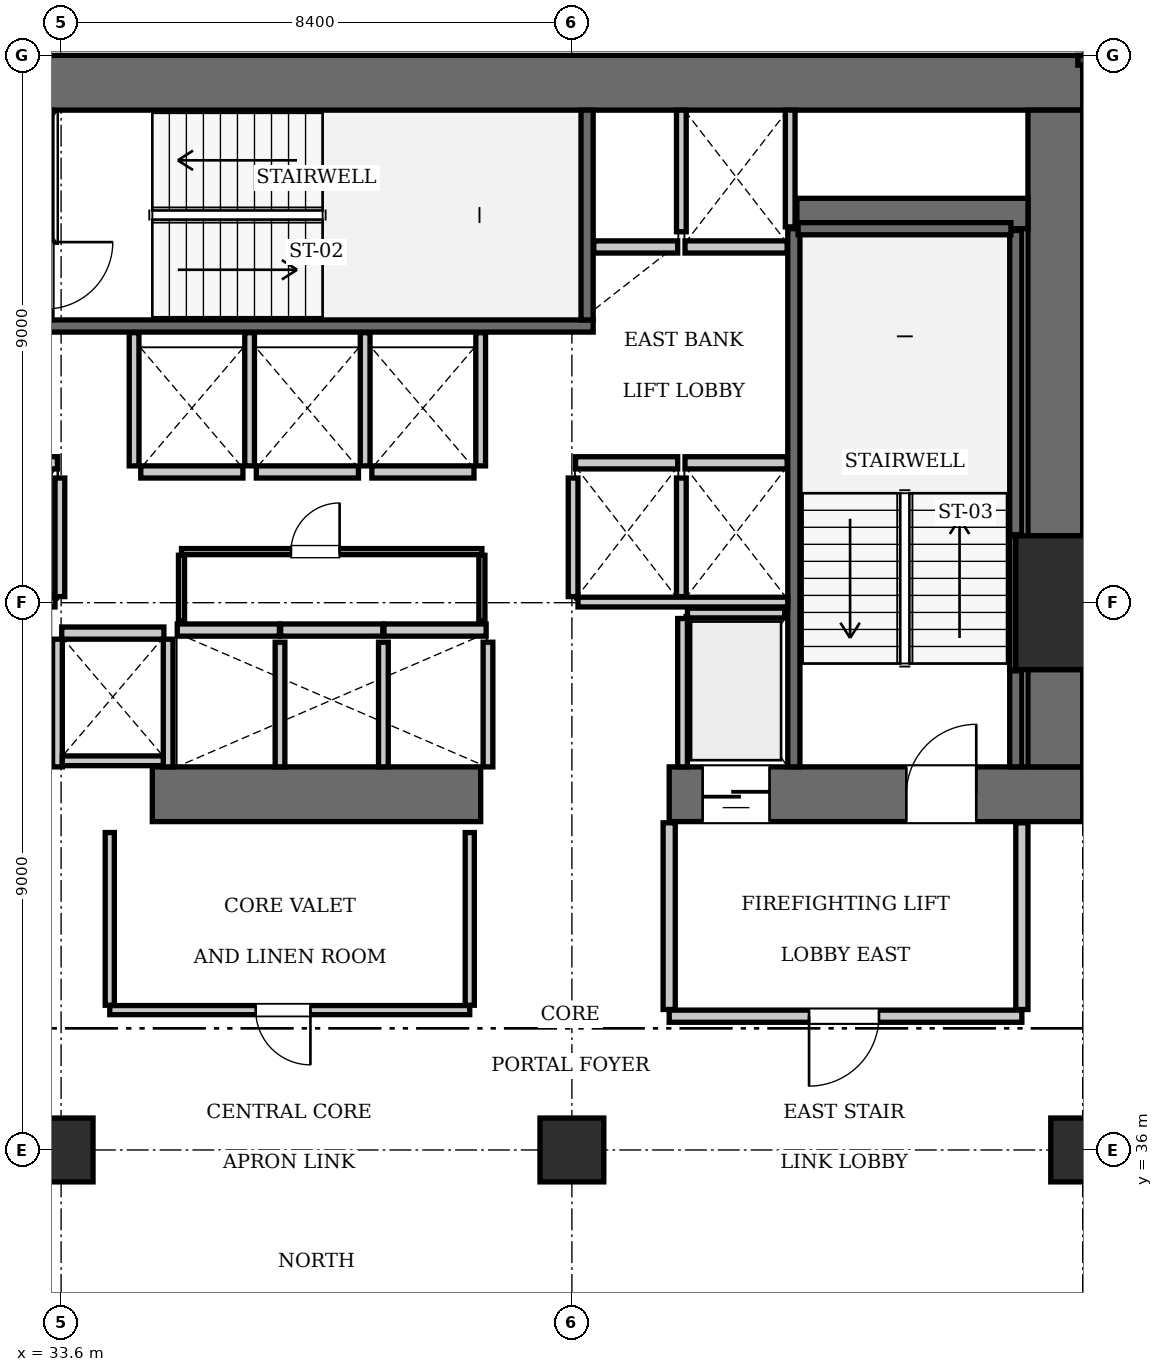
"""IFC4 building model, lengths in metres.
Left out: names, types, materials, properties, quantities, classifications, styles, units other than length and angle.
Written with IfcOpenShell. Run it as: python <this file> out.ifc"""

import sys

from ifc_helpers import new_model, si_unit, direction, frame, frame_2d, origin, origin_2d, place, context, subcontext, project, spatial, rectangle, extrude, element, fill, save


model = new_model("IFC4")
c1 = context("Model", 3, precision=1e-05, world=origin(), true_north=direction((0.0, 1.0)))
c2 = subcontext(c1, "Body", "Model", "MODEL_VIEW")
j1 = project(units=[si_unit("LENGTHUNIT", "METRE"), si_unit("PLANEANGLEUNIT", "RADIAN")], contexts=[c1])
p1 = place(None, origin())
s1 = spatial("IfcSite", under=j1, at=p1, CompositionType="ELEMENT")
p2 = place(p1, origin())
s2 = spatial("IfcBuilding", under=s1, at=p2, CompositionType="ELEMENT")
p3 = place(p2, frame((0.0, 0.0, 100.1)))
s3 = spatial("IfcBuildingStorey", under=s2, at=p3, CompositionType="ELEMENT", Elevation=100.1)
p4 = place(p3, frame((50.4, 45.0, 0.0), z_axis=(0.0, 0.0, 1.0), x_axis=(1.0, 0.0, 0.0)))
e1 = element("IfcColumn", 1, at=p4, inside=s3, PredefinedType="COLUMN", context=c2, shape_type="SweptSolid", body=[
    extrude(rectangle(XDim=2.2, YDim=2.2, at=origin_2d()), origin(), (0.0, 0.0, 1.0), 3.85),
])
p5 = place(p3, frame((25.2, 53.55, 0.0), z_axis=(0.0, 0.0, 1.0), x_axis=(1.0, 0.0, 0.0)))
e2 = element("IfcWall", 2, at=p5, inside=s3, PredefinedType="SHEAR", context=c2, shape_type="SweptSolid", body=[
    extrude(rectangle(XDim=25.2, YDim=0.9, at=frame_2d((12.6, 0.0))), origin(), (0.0, 0.0, 1.0), 3.85),
])
p6 = place(p3, frame((35.1, 41.85, 0.0), z_axis=(0.0, 0.0, 1.0), x_axis=(1.0, 0.0, 0.0)))
e3 = element("IfcWall", 3, at=p6, inside=s3, PredefinedType="SHEAR", context=c2, shape_type="SweptSolid", body=[
    extrude(rectangle(XDim=5.4, YDim=0.9, at=frame_2d((2.7, 0.0))), origin(), (0.0, 0.0, 1.0), 3.85),
])
p7 = place(p3, frame((43.6, 41.85, 0.0), z_axis=(0.0, 0.0, 1.0), x_axis=(1.0, 0.0, 0.0)))
e4 = element("IfcWall", 4, at=p7, inside=s3, PredefinedType="SHEAR", context=c2, shape_type="SweptSolid", body=[
    extrude(rectangle(XDim=6.8, YDim=0.9, at=frame_2d((3.4, 0.0))), origin(), (0.0, 0.0, 1.0), 3.85),
])
p8 = place(p7, frame((3.9, 0.0, 0.0)))
e5 = element("IfcOpeningElement", 5, at=p8, cuts=e4, PredefinedType="OPENING", context=c2, shape_type="SweptSolid", body=[
    extrude(rectangle(XDim=1.15, YDim=2.15, at=frame_2d((0.575, 1.075))), frame((0.0, 0.46, 0.0), z_axis=(0.0, -1.0, 0.0), x_axis=(1.0, 0.0, 0.0)), (0.0, 0.0, 1.0), 0.92),
])
p9 = place(p7, frame((0.55, 0.0, 0.0)))
e6 = element("IfcOpeningElement", 6, at=p9, cuts=e4, PredefinedType="OPENING", context=c2, shape_type="SweptSolid", body=[
    extrude(rectangle(XDim=1.1, YDim=2.2, at=frame_2d((0.55, 1.1))), frame((0.0, 0.46, 0.0), z_axis=(0.0, -1.0, 0.0), x_axis=(1.0, 0.0, 0.0)), (0.0, 0.0, 1.0), 0.92),
])
p10 = place(p3, frame((49.95, 42.3, 0.0), z_axis=(0.0, 0.0, 1.0), x_axis=(0.0, 1.0, 0.0)))
e7 = element("IfcWall", 7, at=p10, inside=s3, PredefinedType="SHEAR", context=c2, shape_type="SweptSolid", body=[
    extrude(rectangle(XDim=1.6, YDim=0.9, at=frame_2d((0.8, 0.0))), origin(), (0.0, 0.0, 1.0), 3.85),
])
p11 = place(p3, frame((49.95, 46.1, 0.0), z_axis=(0.0, 0.0, 1.0), x_axis=(0.0, 1.0, 0.0)))
e8 = element("IfcWall", 8, at=p11, inside=s3, PredefinedType="SHEAR", context=c2, shape_type="SweptSolid", body=[
    extrude(rectangle(XDim=7.0, YDim=0.9, at=frame_2d((3.5, 0.0))), origin(), (0.0, 0.0, 1.0), 3.85),
])
p12 = place(p3, frame((45.7, 51.4, 0.0), z_axis=(0.0, 0.0, 1.0), x_axis=(1.0, 0.0, 0.0)))
e9 = element("IfcWall", 9, at=p12, inside=s3, PredefinedType="SHEAR", context=c2, shape_type="SweptSolid", body=[
    extrude(rectangle(XDim=3.8, YDim=0.5, at=frame_2d((1.9, 0.0))), origin(), (0.0, 0.0, 1.0), 3.85),
])
for number, where, z_axis, x_axis in (
    (10, (33.6, 36.0, 0.0), (0.0, 0.0, 1.0), (1.0, 0.0, 0.0)),
    (11, (42.0, 36.0, 0.0), (0.0, 0.0, 1.0), (1.0, 0.0, 0.0)),
    (12, (50.4, 36.0, 0.0), (0.0, 0.0, 1.0), (1.0, 0.0, 0.0)),
):
    element("IfcColumn", number, at=place(p3, frame(where, z_axis=z_axis, x_axis=x_axis)), inside=s3, PredefinedType="COLUMN", context=c2, shape_type="SweptSolid", body=[
        extrude(rectangle(XDim=1.05, YDim=1.05, at=origin_2d()), origin(), (0.0, 0.0, 1.0), 3.85),
    ])
p13 = place(p3, frame((33.25, 49.55, 0.0), z_axis=(0.0, 0.0, 1.0), x_axis=(1.0, 0.0, 0.0)))
e13 = element("IfcWall", 13, at=p13, inside=s3, PredefinedType="SOLIDWALL", context=c2, shape_type="SweptSolid", body=[
    extrude(rectangle(XDim=9.1, YDim=0.2, at=frame_2d((4.55, 0.0))), origin(), (0.0, 0.0, 1.0), 3.61),
])
p14 = place(p3, frame((42.25, 49.65, 0.0), z_axis=(0.0, 0.0, 1.0), x_axis=(0.0, 1.0, 0.0)))
e14 = element("IfcWall", 14, at=p14, inside=s3, PredefinedType="SOLIDWALL", context=c2, shape_type="SweptSolid", body=[
    extrude(rectangle(XDim=3.45, YDim=0.2, at=frame_2d((1.725, 0.0))), origin(), (0.0, 0.0, 1.0), 3.61),
])
p15 = place(p3, frame((33.35, 49.65, 0.0), z_axis=(0.0, 0.0, 1.0), x_axis=(0.0, 1.0, 0.0)))
e15 = element("IfcWall", 15, at=p15, inside=s3, PredefinedType="SOLIDWALL", context=c2, shape_type="SweptSolid", body=[
    extrude(rectangle(XDim=3.45, YDim=0.2, at=frame_2d((1.725, 0.0))), origin(), (0.0, 0.0, 1.0), 3.61),
])
p16 = place(p15, frame((0.18, 0.0, 0.0)))
e16 = element("IfcOpeningElement", 16, at=p16, cuts=e15, PredefinedType="OPENING", context=c2, shape_type="SweptSolid", body=[
    extrude(rectangle(XDim=1.1, YDim=2.15, at=frame_2d((0.55, 1.075))), frame((0.0, 0.11, 0.0), z_axis=(0.0, -1.0, 0.0), x_axis=(1.0, 0.0, 0.0)), (0.0, 0.0, 1.0), 0.22),
])
p17 = place(p3, frame((45.65, 42.3, 0.0), z_axis=(0.0, 0.0, 1.0), x_axis=(0.0, 1.0, 0.0)))
e17 = element("IfcWall", 17, at=p17, inside=s3, PredefinedType="SOLIDWALL", context=c2, shape_type="SweptSolid", body=[
    extrude(rectangle(XDim=8.85, YDim=0.2, at=frame_2d((4.425, 0.0))), origin(), (0.0, 0.0, 1.0), 3.61),
])
p18 = place(p3, frame((49.3, 42.3, 0.0), z_axis=(0.0, 0.0, 1.0), x_axis=(0.0, 1.0, 0.0)))
e18 = element("IfcWall", 18, at=p18, inside=s3, PredefinedType="SOLIDWALL", context=c2, shape_type="SweptSolid", body=[
    extrude(rectangle(XDim=1.58, YDim=0.2, at=frame_2d((0.79, 0.0))), origin(), (0.0, 0.0, 1.0), 3.61),
])
p19 = place(p3, frame((49.3, 46.12, 0.0), z_axis=(0.0, 0.0, 1.0), x_axis=(0.0, 1.0, 0.0)))
e19 = element("IfcWall", 19, at=p19, inside=s3, PredefinedType="SOLIDWALL", context=c2, shape_type="SweptSolid", body=[
    extrude(rectangle(XDim=5.0, YDim=0.2, at=frame_2d((2.5, 0.0))), origin(), (0.0, 0.0, 1.0), 3.61),
])
p20 = place(p3, frame((45.72, 51.15, 0.0), z_axis=(0.0, 0.0, 1.0), x_axis=(1.0, 0.0, 0.0)))
e20 = element("IfcWall", 20, at=p20, inside=s3, PredefinedType="SOLIDWALL", context=c2, shape_type="SweptSolid", body=[
    extrude(rectangle(XDim=3.5, YDim=0.2, at=frame_2d((1.75, 0.0))), origin(), (0.0, 0.0, 1.0), 3.61),
])
p21 = place(p3, frame((49.248, 43.9, 0.0), z_axis=(0.0, 0.0, 1.0), x_axis=(0.0, 1.0, 0.0)))
e21 = element("IfcWall", 21, at=p21, inside=s3, PredefinedType="SOLIDWALL", context=c2, shape_type="SweptSolid", body=[
    extrude(rectangle(XDim=2.2, YDim=0.1, at=frame_2d((1.1, 0.0))), origin(), (0.0, 0.0, 1.0), 3.61),
])
p22 = place(p3, frame((31.86, 47.3, 0.0), z_axis=(0.0, 0.0, 1.0), x_axis=(1.0, 0.0, 0.0)))
e22 = element("IfcWall", 22, at=p22, inside=s3, PredefinedType="SOLIDWALL", context=c2, shape_type="SweptSolid", body=[
    extrude(rectangle(XDim=1.68, YDim=0.2, at=frame_2d((0.84, 0.0))), origin(), (0.0, 0.0, 1.0), 3.61),
])
p23 = place(p22, frame((0.34, 0.0, 0.0)))
e23 = element("IfcOpeningElement", 23, at=p23, cuts=e22, PredefinedType="OPENING", context=c2, shape_type="SweptSolid", body=[
    extrude(rectangle(XDim=1.0, YDim=2.15, at=frame_2d((0.5, 1.075))), frame((0.0, 0.11, 0.0), z_axis=(0.0, -1.0, 0.0), x_axis=(1.0, 0.0, 0.0)), (0.0, 0.0, 1.0), 0.22),
])
for number, where, z_axis, x_axis in (
    (24, (42.06, 47.3, 0.0), (0.0, 0.0, 1.0), (1.0, 0.0, 0.0)),
    (25, (43.86, 47.3, 0.0), (0.0, 0.0, 1.0), (1.0, 0.0, 0.0)),
):
    element("IfcWall", number, at=place(p3, frame(where, z_axis=z_axis, x_axis=x_axis)), inside=s3, PredefinedType="SOLIDWALL", context=c2, shape_type="SweptSolid", body=[
        extrude(rectangle(XDim=1.68, YDim=0.2, at=frame_2d((0.84, 0.0))), origin(), (0.0, 0.0, 1.0), 3.61),
    ])
p24 = place(p3, frame((42.36, 50.85, 0.0), z_axis=(0.0, 0.0, 1.0), x_axis=(1.0, 0.0, 0.0)))
e26 = element("IfcWall", 26, at=p24, inside=s3, PredefinedType="SOLIDWALL", context=c2, shape_type="SweptSolid", body=[
    extrude(rectangle(XDim=1.38, YDim=0.2, at=frame_2d((0.69, 0.0))), origin(), (0.0, 0.0, 1.0), 3.61),
])
for number, where, z_axis, x_axis in (
    (27, (43.86, 50.85, 0.0), (0.0, 0.0, 1.0), (1.0, 0.0, 0.0)),
    (28, (35.51, 44.55, 0.0), (0.0, 0.0, 1.0), (1.0, 0.0, 0.0)),
    (29, (37.21, 44.55, 0.0), (0.0, 0.0, 1.0), (1.0, 0.0, 0.0)),
):
    element("IfcWall", number, at=place(p3, frame(where, z_axis=z_axis, x_axis=x_axis)), inside=s3, PredefinedType="SOLIDWALL", context=c2, shape_type="SweptSolid", body=[
        extrude(rectangle(XDim=1.68, YDim=0.2, at=frame_2d((0.84, 0.0))), origin(), (0.0, 0.0, 1.0), 3.61),
    ])
for number, where, z_axis, x_axis in (
    (30, (38.91, 44.55, 0.0), (0.0, 0.0, 1.0), (1.0, 0.0, 0.0)),
    (31, (34.91, 47.15, 0.0), (0.0, 0.0, 1.0), (1.0, 0.0, 0.0)),
):
    element("IfcWall", number, at=place(p3, frame(where, z_axis=z_axis, x_axis=x_axis)), inside=s3, PredefinedType="SOLIDWALL", context=c2, shape_type="SweptSolid", body=[
        extrude(rectangle(XDim=1.68, YDim=0.2, at=frame_2d((0.84, 0.0))), origin(), (0.0, 0.0, 1.0), 3.61),
    ])
for number, where, z_axis, x_axis in (
    (32, (36.81, 47.15, 0.0), (0.0, 0.0, 1.0), (1.0, 0.0, 0.0)),
    (33, (38.71, 47.15, 0.0), (0.0, 0.0, 1.0), (1.0, 0.0, 0.0)),
    (34, (33.61, 44.5, 0.0), (0.0, 0.0, 1.0), (1.0, 0.0, 0.0)),
):
    element("IfcWall", number, at=place(p3, frame(where, z_axis=z_axis, x_axis=x_axis)), inside=s3, PredefinedType="SOLIDWALL", context=c2, shape_type="SweptSolid", body=[
        extrude(rectangle(XDim=1.68, YDim=0.2, at=frame_2d((0.84, 0.0))), origin(), (0.0, 0.0, 1.0), 3.61),
    ])
p25 = place(p3, frame((43.9, 44.83, 0.0), z_axis=(0.0, 0.0, 1.0), x_axis=(1.0, 0.0, 0.0)))
e35 = element("IfcWall", 35, at=p25, inside=s3, PredefinedType="SOLIDWALL", context=c2, shape_type="SweptSolid", body=[
    extrude(rectangle(XDim=1.6, YDim=0.16, at=frame_2d((0.8, 0.0))), origin(), (0.0, 0.0, 1.0), 3.61),
])
p26 = place(p3, frame((43.82, 42.3, 0.0), z_axis=(0.0, 0.0, 1.0), x_axis=(0.0, 1.0, 0.0)))
e36 = element("IfcWall", 36, at=p26, inside=s3, PredefinedType="SOLIDWALL", context=c2, shape_type="SweptSolid", body=[
    extrude(rectangle(XDim=2.44, YDim=0.16, at=frame_2d((1.22, 0.0))), origin(), (0.0, 0.0, 1.0), 3.61),
])
p27 = place(p3, frame((33.58, 45.1, 0.0), z_axis=(0.0, 0.0, 1.0), x_axis=(0.0, 1.0, 0.0)))
e37 = element("IfcWall", 37, at=p27, inside=s3, PredefinedType="SOLIDWALL", context=c2, shape_type="SweptSolid", body=[
    extrude(rectangle(XDim=1.95, YDim=0.16, at=frame_2d((0.975, 0.0))), origin(), (0.0, 0.0, 1.0), 3.61),
])
p28 = place(p3, frame((30.05, 45.01, 0.0), z_axis=(0.0, 0.0, 1.0), x_axis=(1.0, 0.0, 0.0)))
e38 = element("IfcWall", 38, at=p28, inside=s3, PredefinedType="SOLIDWALL", context=c2, shape_type="SweptSolid", body=[
    extrude(rectangle(XDim=3.45, YDim=0.16, at=frame_2d((1.725, 0.0))), origin(), (0.0, 0.0, 1.0), 3.61),
])
for number, where, z_axis, x_axis in (
    (39, (42.02, 45.1, 0.0), (0.0, 0.0, 1.0), (0.0, 1.0, 0.0)),
    (40, (43.8, 45.1, 0.0), (0.0, 0.0, 1.0), (0.0, 1.0, 0.0)),
):
    element("IfcWall", number, at=place(p3, frame(where, z_axis=z_axis, x_axis=x_axis)), inside=s3, PredefinedType="SOLIDWALL", context=c2, shape_type="SweptSolid", body=[
        extrude(rectangle(XDim=1.95, YDim=0.16, at=frame_2d((0.975, 0.0))), origin(), (0.0, 0.0, 1.0), 3.61),
    ])
p29 = place(p3, frame((42.1, 45.01, 0.0), z_axis=(0.0, 0.0, 1.0), x_axis=(1.0, 0.0, 0.0)))
e41 = element("IfcWall", 41, at=p29, inside=s3, PredefinedType="SOLIDWALL", context=c2, shape_type="SweptSolid", body=[
    extrude(rectangle(XDim=3.45, YDim=0.16, at=frame_2d((1.725, 0.0))), origin(), (0.0, 0.0, 1.0), 3.61),
])
p30 = place(p3, frame((45.59, 51.18, 0.0), z_axis=(0.0, 0.0, 1.0), x_axis=(0.0, 1.0, 0.0)))
e42 = element("IfcWall", 42, at=p30, inside=s3, PredefinedType="SOLIDWALL", context=c2, shape_type="SweptSolid", body=[
    extrude(rectangle(XDim=1.92, YDim=0.16, at=frame_2d((0.96, 0.0))), origin(), (0.0, 0.0, 1.0), 3.61),
])
p31 = place(p3, frame((43.8, 51.1, 0.0), z_axis=(0.0, 0.0, 1.0), x_axis=(0.0, 1.0, 0.0)))
e43 = element("IfcWall", 43, at=p31, inside=s3, PredefinedType="SOLIDWALL", context=c2, shape_type="SweptSolid", body=[
    extrude(rectangle(XDim=2.0, YDim=0.16, at=frame_2d((1.0, 0.0))), origin(), (0.0, 0.0, 1.0), 3.61),
])
for number, where, z_axis, x_axis in (
    (44, (37.2, 42.3, 0.0), (0.0, 0.0, 1.0), (0.0, 1.0, 0.0)),
    (45, (38.9, 42.3, 0.0), (0.0, 0.0, 1.0), (0.0, 1.0, 0.0)),
    (46, (40.62, 42.3, 0.0), (0.0, 0.0, 1.0), (0.0, 1.0, 0.0)),
):
    element("IfcWall", number, at=place(p3, frame(where, z_axis=z_axis, x_axis=x_axis)), inside=s3, PredefinedType="SOLIDWALL", context=c2, shape_type="SweptSolid", body=[
        extrude(rectangle(XDim=2.05, YDim=0.16, at=frame_2d((1.025, 0.0))), origin(), (0.0, 0.0, 1.0), 3.61),
    ])
for number, where, z_axis, x_axis in (
    (47, (34.8, 47.25, 0.0), (0.0, 0.0, 1.0), (0.0, 1.0, 0.0)),
    (48, (36.7, 47.25, 0.0), (0.0, 0.0, 1.0), (0.0, 1.0, 0.0)),
    (49, (38.6, 47.25, 0.0), (0.0, 0.0, 1.0), (0.0, 1.0, 0.0)),
    (50, (40.5, 47.25, 0.0), (0.0, 0.0, 1.0), (0.0, 1.0, 0.0)),
):
    element("IfcWall", number, at=place(p3, frame(where, z_axis=z_axis, x_axis=x_axis)), inside=s3, PredefinedType="SOLIDWALL", context=c2, shape_type="SweptSolid", body=[
        extrude(rectangle(XDim=2.19, YDim=0.16, at=frame_2d((1.095, 0.0))), origin(), (0.0, 0.0, 1.0), 3.61),
    ])
for number, where, z_axis, x_axis in (
    (51, (33.54, 42.3, 0.0), (0.0, 0.0, 1.0), (0.0, 1.0, 0.0)),
    (52, (35.36, 42.3, 0.0), (0.0, 0.0, 1.0), (0.0, 1.0, 0.0)),
):
    element("IfcWall", number, at=place(p3, frame(where, z_axis=z_axis, x_axis=x_axis)), inside=s3, PredefinedType="SOLIDWALL", context=c2, shape_type="SweptSolid", body=[
        extrude(rectangle(XDim=2.1, YDim=0.16, at=frame_2d((1.05, 0.0))), origin(), (0.0, 0.0, 1.0), 3.61),
    ])
p32 = place(p3, frame((33.62, 42.4, 0.0), z_axis=(0.0, 0.0, 1.0), x_axis=(1.0, 0.0, 0.0)))
e53 = element("IfcWall", 53, at=p32, inside=s3, PredefinedType="SOLIDWALL", context=c2, shape_type="SweptSolid", body=[
    extrude(rectangle(XDim=1.66, YDim=0.16, at=frame_2d((0.83, 0.0))), origin(), (0.0, 0.0, 1.0), 3.61),
])
p33 = place(p3, frame((43.6, 38.2, 0.0), z_axis=(0.0, 0.0, 1.0), x_axis=(1.0, 0.0, 0.0)))
e54 = element("IfcWall", 54, at=p33, inside=s3, PredefinedType="PARTITIONING", context=c2, shape_type="SweptSolid", body=[
    extrude(rectangle(XDim=5.8, YDim=0.2, at=frame_2d((2.9, 0.0))), origin(), (0.0, 0.0, 1.0), 3.61),
])
p34 = place(p33, frame((2.3, 0.0, 0.0)))
e55 = element("IfcOpeningElement", 55, at=p34, cuts=e54, PredefinedType="OPENING", context=c2, shape_type="SweptSolid", body=[
    extrude(rectangle(XDim=1.15, YDim=2.15, at=frame_2d((0.575, 1.075))), frame((0.0, 0.11, 0.0), z_axis=(0.0, -1.0, 0.0), x_axis=(1.0, 0.0, 0.0)), (0.0, 0.0, 1.0), 0.22),
])
for number, where, z_axis, x_axis in (
    (56, (43.6, 38.31, 0.0), (0.0, 0.0, 1.0), (0.0, 1.0, 0.0)),
    (57, (49.4, 38.31, 0.0), (0.0, 0.0, 1.0), (0.0, 1.0, 0.0)),
):
    element("IfcWall", number, at=place(p3, frame(where, z_axis=z_axis, x_axis=x_axis)), inside=s3, PredefinedType="PARTITIONING", context=c2, shape_type="SweptSolid", body=[
        extrude(rectangle(XDim=3.07, YDim=0.2, at=frame_2d((1.535, 0.0))), origin(), (0.0, 0.0, 1.0), 3.61),
    ])
p35 = place(p3, frame((35.58, 45.84, 0.0), z_axis=(0.0, 0.0, 1.0), x_axis=(1.0, 0.0, 0.0)))
e58 = element("IfcWall", 58, at=p35, inside=s3, PredefinedType="PARTITIONING", context=c2, shape_type="SweptSolid", body=[
    extrude(rectangle(XDim=4.94, YDim=0.1, at=frame_2d((2.47, 0.0))), origin(), (0.0, 0.0, 1.0), 3.61),
])
p36 = place(p35, frame((1.8, 0.0, 0.0)))
e59 = element("IfcOpeningElement", 59, at=p36, cuts=e58, PredefinedType="OPENING", context=c2, shape_type="SweptSolid", body=[
    extrude(rectangle(XDim=0.8, YDim=2.05, at=frame_2d((0.4, 1.025))), frame((0.0, 0.06, 0.0), z_axis=(0.0, -1.0, 0.0), x_axis=(1.0, 0.0, 0.0)), (0.0, 0.0, 1.0), 0.12),
])
for number, where, z_axis, x_axis in (
    (60, (35.58, 44.7, 0.0), (0.0, 0.0, 1.0), (0.0, 1.0, 0.0)),
    (61, (40.52, 44.7, 0.0), (0.0, 0.0, 1.0), (0.0, 1.0, 0.0)),
):
    element("IfcWall", number, at=place(p3, frame(where, z_axis=z_axis, x_axis=x_axis)), inside=s3, PredefinedType="PARTITIONING", context=c2, shape_type="SweptSolid", body=[
        extrude(rectangle(XDim=1.08, YDim=0.1, at=frame_2d((0.54, 0.0))), origin(), (0.0, 0.0, 1.0), 3.61),
    ])
p37 = place(p3, frame((34.4, 38.3, 0.0), z_axis=(0.0, 0.0, 1.0), x_axis=(1.0, 0.0, 0.0)))
e62 = element("IfcWall", 62, at=p37, inside=s3, PredefinedType="PARTITIONING", context=c2, shape_type="SweptSolid", body=[
    extrude(rectangle(XDim=5.92, YDim=0.15, at=frame_2d((2.96, 0.0))), origin(), (0.0, 0.0, 1.0), 3.61),
])
p38 = place(p37, frame((2.4, 0.0, 0.0)))
e63 = element("IfcOpeningElement", 63, at=p38, cuts=e62, PredefinedType="OPENING", context=c2, shape_type="SweptSolid", body=[
    extrude(rectangle(XDim=0.9, YDim=2.1, at=frame_2d((0.45, 1.05))), frame((0.0, 0.085, 0.0), z_axis=(0.0, -1.0, 0.0), x_axis=(1.0, 0.0, 0.0)), (0.0, 0.0, 1.0), 0.17),
])
for number, where, z_axis, x_axis in (
    (64, (34.4, 38.38, 0.0), (0.0, 0.0, 1.0), (0.0, 1.0, 0.0)),
    (65, (40.32, 38.38, 0.0), (0.0, 0.0, 1.0), (0.0, 1.0, 0.0)),
):
    element("IfcWall", number, at=place(p3, frame(where, z_axis=z_axis, x_axis=x_axis)), inside=s3, PredefinedType="PARTITIONING", context=c2, shape_type="SweptSolid", body=[
        extrude(rectangle(XDim=2.84, YDim=0.15, at=frame_2d((1.42, 0.0))), origin(), (0.0, 0.0, 1.0), 3.61),
    ])
p39 = place(p8, origin())
e66 = element("IfcDoor", 66, at=p39, inside=s3, OperationType="SINGLE_SWING_RIGHT", PredefinedType="DOOR", context=c2, shape_type="SweptSolid", body=[
    extrude(rectangle(XDim=1.15, YDim=2.15, at=frame_2d((0.575, 1.075))), frame((0.0, 0.025, 0.0), z_axis=(0.0, -1.0, 0.0), x_axis=(1.0, 0.0, 0.0)), (0.0, 0.0, 1.0), 0.05),
])
fill(e5, e66)
p40 = place(p9, frame((1.1, 0.0, 0.0), z_axis=(0.0, 0.0, 1.0), x_axis=(-1.0, 0.0, 0.0)))
e67 = element("IfcDoor", 67, at=p40, inside=s3, OperationType="SLIDING_TO_LEFT", PredefinedType="DOOR", context=c2, shape_type="SweptSolid", body=[
    extrude(rectangle(XDim=1.1, YDim=2.2, at=frame_2d((0.55, 1.1))), frame((0.0, 0.025, 0.0), z_axis=(0.0, -1.0, 0.0), x_axis=(1.0, 0.0, 0.0)), (0.0, 0.0, 1.0), 0.05),
])
fill(e6, e67)
p41 = place(p34, frame((1.15, 0.0, 0.0), z_axis=(0.0, 0.0, 1.0), x_axis=(-1.0, 0.0, 0.0)))
e68 = element("IfcDoor", 68, at=p41, inside=s3, OperationType="SINGLE_SWING_RIGHT", PredefinedType="DOOR", context=c2, shape_type="SweptSolid", body=[
    extrude(rectangle(XDim=1.15, YDim=2.15, at=frame_2d((0.575, 1.075))), frame((0.0, 0.025, 0.0), z_axis=(0.0, -1.0, 0.0), x_axis=(1.0, 0.0, 0.0)), (0.0, 0.0, 1.0), 0.05),
])
fill(e55, e68)
p42 = place(p36, origin())
e69 = element("IfcDoor", 69, at=p42, inside=s3, OperationType="SINGLE_SWING_RIGHT", PredefinedType="DOOR", context=c2, shape_type="SweptSolid", body=[
    extrude(rectangle(XDim=0.8, YDim=2.05, at=frame_2d((0.4, 1.025))), frame((0.0, 0.025, 0.0), z_axis=(0.0, -1.0, 0.0), x_axis=(1.0, 0.0, 0.0)), (0.0, 0.0, 1.0), 0.05),
])
fill(e59, e69)
p43 = place(p38, frame((0.9, 0.0, 0.0), z_axis=(0.0, 0.0, 1.0), x_axis=(-1.0, 0.0, 0.0)))
e70 = element("IfcDoor", 70, at=p43, inside=s3, OperationType="SINGLE_SWING_LEFT", PredefinedType="DOOR", context=c2, shape_type="SweptSolid", body=[
    extrude(rectangle(XDim=0.9, YDim=2.1, at=frame_2d((0.45, 1.05))), frame((0.0, 0.025, 0.0), z_axis=(0.0, -1.0, 0.0), x_axis=(1.0, 0.0, 0.0)), (0.0, 0.0, 1.0), 0.05),
])
fill(e63, e70)
save(model, sys.argv[1])
